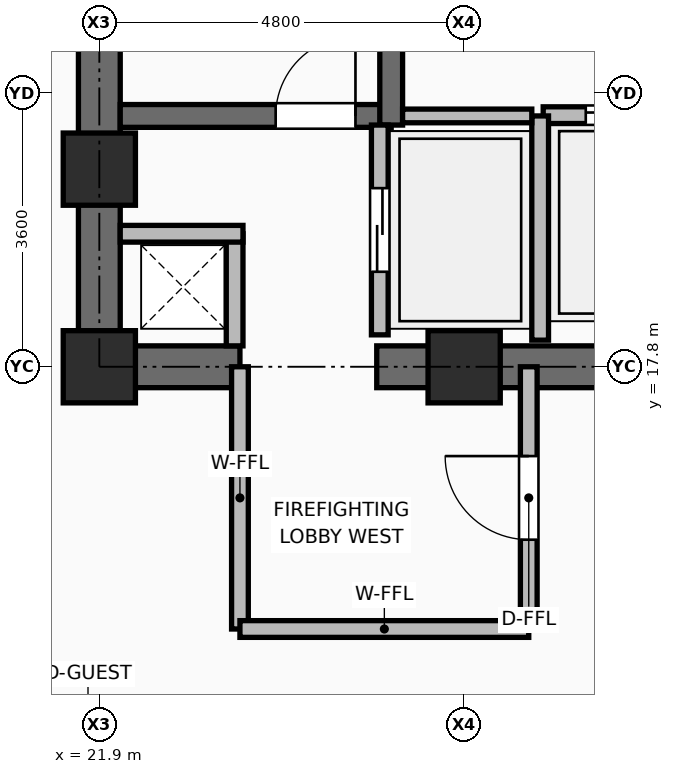
"""IFC4 building model, lengths in metres.
Left out: names, types, materials, properties, quantities, classifications, styles, units other than length and angle.
Written with IfcOpenShell. Run it as: python <this file> out.ifc"""

import sys

from ifc_helpers import new_model, si_unit, direction, frame, frame_2d, origin, origin_2d, place, context, subcontext, project, spatial, rectangle, extrude, element, fill, save


model = new_model("IFC4")
c1 = context("Model", 3, precision=1e-05, world=origin(), true_north=direction((0.0, 1.0)))
c2 = subcontext(c1, "Body", "Model", "MODEL_VIEW")
j1 = project(units=[si_unit("LENGTHUNIT", "METRE"), si_unit("PLANEANGLEUNIT", "RADIAN")], contexts=[c1])
p1 = place(None, origin())
s1 = spatial("IfcSite", under=j1, at=p1, CompositionType="ELEMENT")
p2 = place(p1, origin())
s2 = spatial("IfcBuilding", under=s1, at=p2, CompositionType="ELEMENT")
p3 = place(p2, frame((0.0, 0.0, 157.2)))
s3 = spatial("IfcBuildingStorey", under=s2, at=p3, CompositionType="ELEMENT", Elevation=157.2)
for number, where, z_axis, x_axis in (
    (1, (21.9, 17.8, 0.0), (0.0, 0.0, 1.0), (1.0, 0.0, 0.0)),
    (2, (26.7, 17.8, 0.0), (0.0, 0.0, 1.0), (1.0, 0.0, 0.0)),
    (3, (21.9, 20.4, 0.0), (0.0, 0.0, 1.0), (1.0, 0.0, 0.0)),
):
    element("IfcColumn", number, at=place(p3, frame(where, z_axis=z_axis, x_axis=x_axis)), inside=s3, PredefinedType="COLUMN", context=c2, shape_type="SweptSolid", body=[
        extrude(rectangle(XDim=0.95, YDim=0.95, at=origin_2d()), origin(), (0.0, 0.0, 1.0), 3.75),
    ])
p4 = place(p3, frame((21.625, 17.8, 0.0), z_axis=(0.0, 0.0, 1.0), x_axis=(1.0, 0.0, 0.0)))
e4 = element("IfcWall", 4, at=p4, inside=s3, PredefinedType="SHEAR", context=c2, shape_type="SweptSolid", body=[
    extrude(rectangle(XDim=2.125, YDim=0.55, at=frame_2d((1.062, 0.0))), origin(), (0.0, 0.0, 1.0), 3.57),
])
p5 = place(p3, frame((25.55, 17.8, 0.0), z_axis=(0.0, 0.0, 1.0), x_axis=(1.0, 0.0, 0.0)))
e5 = element("IfcWall", 5, at=p5, inside=s3, PredefinedType="SHEAR", context=c2, shape_type="SweptSolid", body=[
    extrude(rectangle(XDim=6.9, YDim=0.55, at=frame_2d((3.45, 0.0))), origin(), (0.0, 0.0, 1.0), 3.57),
])
p6 = place(p3, frame((21.9, 18.075, 0.0), z_axis=(0.0, 0.0, 1.0), x_axis=(0.0, 1.0, 0.0)))
e6 = element("IfcWall", 6, at=p6, inside=s3, PredefinedType="SHEAR", context=c2, shape_type="SweptSolid", body=[
    extrude(rectangle(XDim=14.1, YDim=0.55, at=frame_2d((7.05, 0.0))), origin(), (0.0, 0.0, 1.0), 3.57),
])
p7 = place(p3, frame((22.175, 21.1, 0.0), z_axis=(0.0, 0.0, 1.0), x_axis=(1.0, 0.0, 0.0)))
e7 = element("IfcWall", 7, at=p7, inside=s3, PredefinedType="SHEAR", context=c2, shape_type="SweptSolid", body=[
    extrude(rectangle(XDim=3.565, YDim=0.3, at=frame_2d((1.782, 0.0))), origin(), (0.0, 0.0, 1.0), 3.57),
])
p8 = place(p7, frame((2.045, 0.0, 0.0)))
e8 = element("IfcOpeningElement", 8, at=p8, cuts=e7, PredefinedType="OPENING", context=c2, shape_type="SweptSolid", body=[
    extrude(rectangle(XDim=1.05, YDim=2.1, at=frame_2d((0.525, 1.05))), frame((0.0, 0.16, 0.0), z_axis=(0.0, -1.0, 0.0), x_axis=(1.0, 0.0, 0.0)), (0.0, 0.0, 1.0), 0.32),
])
p9 = place(p3, frame((25.74, 20.98, 0.0), z_axis=(0.0, 0.0, 1.0), x_axis=(0.0, 1.0, 0.0)))
e9 = element("IfcWall", 9, at=p9, inside=s3, PredefinedType="SHEAR", context=c2, shape_type="SweptSolid", body=[
    extrude(rectangle(XDim=7.99, YDim=0.3, at=frame_2d((3.995, 0.0))), origin(), (0.0, 0.0, 1.0), 3.57),
])
p10 = place(p3, frame((23.68, 18.075, 0.0), z_axis=(0.0, 0.0, 1.0), x_axis=(0.0, 1.0, 0.0)))
e10 = element("IfcWall", 10, at=p10, inside=s3, PredefinedType="PARTITIONING", context=c2, shape_type="SweptSolid", body=[
    extrude(rectangle(XDim=1.475, YDim=0.22, at=frame_2d((0.738, 0.0))), origin(), (0.0, 0.0, 1.0), 3.55),
])
p11 = place(p3, frame((22.175, 19.55, 0.0), z_axis=(0.0, 0.0, 1.0), x_axis=(1.0, 0.0, 0.0)))
e11 = element("IfcWall", 11, at=p11, inside=s3, PredefinedType="PARTITIONING", context=c2, shape_type="SweptSolid", body=[
    extrude(rectangle(XDim=1.615, YDim=0.22, at=frame_2d((0.808, 0.0))), origin(), (0.0, 0.0, 1.0), 2.595),
])
p12 = place(p3, frame((25.59, 18.22, 0.0), z_axis=(0.0, 0.0, 1.0), x_axis=(0.0, 1.0, 0.0)))
e12 = element("IfcWall", 12, at=p12, inside=s3, PredefinedType="PARTITIONING", context=c2, shape_type="SweptSolid", body=[
    extrude(rectangle(XDim=2.76, YDim=0.22, at=frame_2d((1.38, 0.0))), origin(), (0.0, 0.0, 1.0), 3.55),
])
p13 = place(p12, frame((0.83, 0.0, 0.0)))
e13 = element("IfcOpeningElement", 13, at=p13, cuts=e12, PredefinedType="OPENING", context=c2, shape_type="SweptSolid", body=[
    extrude(rectangle(XDim=1.1, YDim=2.2, at=frame_2d((0.55, 1.1))), frame((0.0, 0.12, 0.0), z_axis=(0.0, -1.0, 0.0), x_axis=(1.0, 0.0, 0.0)), (0.0, 0.0, 1.0), 0.24),
])
p14 = place(p3, frame((27.74, 21.11, 0.0), z_axis=(0.0, 0.0, 1.0), x_axis=(1.0, 0.0, 0.0)))
e14 = element("IfcWall", 14, at=p14, inside=s3, PredefinedType="PARTITIONING", context=c2, shape_type="SweptSolid", body=[
    extrude(rectangle(XDim=2.22, YDim=0.22, at=frame_2d((1.11, 0.0))), origin(), (0.0, 0.0, 1.0), 3.55),
])
p15 = place(p14, frame((0.56, 0.0, 0.0)))
e15 = element("IfcOpeningElement", 15, at=p15, cuts=e14, PredefinedType="OPENING", context=c2, shape_type="SweptSolid", body=[
    extrude(rectangle(XDim=1.1, YDim=2.2, at=frame_2d((0.55, 1.1))), frame((0.0, 0.12, 0.0), z_axis=(0.0, -1.0, 0.0), x_axis=(1.0, 0.0, 0.0)), (0.0, 0.0, 1.0), 0.24),
])
p16 = place(p3, frame((27.7, 18.15, 0.0), z_axis=(0.0, 0.0, 1.0), x_axis=(0.0, 1.0, 0.0)))
e16 = element("IfcWall", 16, at=p16, inside=s3, PredefinedType="PARTITIONING", context=c2, shape_type="SweptSolid", body=[
    extrude(rectangle(XDim=2.95, YDim=0.22, at=frame_2d((1.475, 0.0))), origin(), (0.0, 0.0, 1.0), 3.55),
])
p17 = place(p3, frame((25.89, 21.1, 0.0), z_axis=(0.0, 0.0, 1.0), x_axis=(1.0, 0.0, 0.0)))
e17 = element("IfcWall", 17, at=p17, inside=s3, PredefinedType="PARTITIONING", context=c2, shape_type="SweptSolid", body=[
    extrude(rectangle(XDim=1.7, YDim=0.18, at=frame_2d((0.85, 0.0))), origin(), (0.0, 0.0, 1.0), 3.55),
])
p18 = place(p3, frame((23.75, 14.35, 0.0), z_axis=(0.0, 0.0, 1.0), x_axis=(0.0, 1.0, 0.0)))
e18 = element("IfcWall", 18, at=p18, inside=s3, PredefinedType="PARTITIONING", context=c2, shape_type="SweptSolid", body=[
    extrude(rectangle(XDim=3.45, YDim=0.22, at=frame_2d((1.725, 0.0))), origin(), (0.0, 0.0, 1.0), 3.006),
])
p19 = place(p3, frame((23.75, 14.35, 0.0), z_axis=(0.0, 0.0, 1.0), x_axis=(1.0, 0.0, 0.0)))
e19 = element("IfcWall", 19, at=p19, inside=s3, PredefinedType="PARTITIONING", context=c2, shape_type="SweptSolid", body=[
    extrude(rectangle(XDim=3.8, YDim=0.22, at=frame_2d((1.9, 0.0))), origin(), (0.0, 0.0, 1.0), 3.55),
])
p20 = place(p3, frame((27.55, 14.35, 0.0), z_axis=(0.0, 0.0, 1.0), x_axis=(0.0, 1.0, 0.0)))
e20 = element("IfcWall", 20, at=p20, inside=s3, PredefinedType="PARTITIONING", context=c2, shape_type="SweptSolid", body=[
    extrude(rectangle(XDim=3.45, YDim=0.22, at=frame_2d((1.725, 0.0))), origin(), (0.0, 0.0, 1.0), 3.006),
])
p21 = place(p20, frame((1.175, 0.0, 0.0)))
e21 = element("IfcOpeningElement", 21, at=p21, cuts=e20, PredefinedType="OPENING", context=c2, shape_type="SweptSolid", body=[
    extrude(rectangle(XDim=1.1, YDim=2.1, at=frame_2d((0.55, 1.05))), frame((0.0, 0.12, 0.0), z_axis=(0.0, -1.0, 0.0), x_axis=(1.0, 0.0, 0.0)), (0.0, 0.0, 1.0), 0.24),
])
p22 = place(p8, origin())
e22 = element("IfcDoor", 22, at=p22, inside=s3, OperationType="SINGLE_SWING_RIGHT", PredefinedType="DOOR", context=c2, shape_type="SweptSolid", body=[
    extrude(rectangle(XDim=1.05, YDim=2.1, at=frame_2d((0.525, 1.05))), frame((0.0, 0.025, 0.0), z_axis=(0.0, -1.0, 0.0), x_axis=(1.0, 0.0, 0.0)), (0.0, 0.0, 1.0), 0.05),
])
fill(e8, e22)
p23 = place(p13, origin())
e23 = element("IfcDoor", 23, at=p23, inside=s3, OperationType="DOUBLE_DOOR_SLIDING", PredefinedType="DOOR", context=c2, shape_type="SweptSolid", body=[
    extrude(rectangle(XDim=1.1, YDim=2.2, at=frame_2d((0.55, 1.1))), frame((0.0, 0.025, 0.0), z_axis=(0.0, -1.0, 0.0), x_axis=(1.0, 0.0, 0.0)), (0.0, 0.0, 1.0), 0.05),
])
fill(e13, e23)
p24 = place(p15, origin())
e24 = element("IfcDoor", 24, at=p24, inside=s3, OperationType="DOUBLE_DOOR_SLIDING", PredefinedType="DOOR", context=c2, shape_type="SweptSolid", body=[
    extrude(rectangle(XDim=1.1, YDim=2.2, at=frame_2d((0.55, 1.1))), frame((0.0, 0.025, 0.0), z_axis=(0.0, -1.0, 0.0), x_axis=(1.0, 0.0, 0.0)), (0.0, 0.0, 1.0), 0.05),
])
fill(e15, e24)
p25 = place(p21, origin())
e25 = element("IfcDoor", 25, at=p25, inside=s3, OperationType="SINGLE_SWING_RIGHT", PredefinedType="DOOR", context=c2, shape_type="SweptSolid", body=[
    extrude(rectangle(XDim=1.1, YDim=2.1, at=frame_2d((0.55, 1.05))), frame((0.0, 0.025, 0.0), z_axis=(0.0, -1.0, 0.0), x_axis=(1.0, 0.0, 0.0)), (0.0, 0.0, 1.0), 0.05),
])
fill(e21, e25)
save(model, sys.argv[1])
